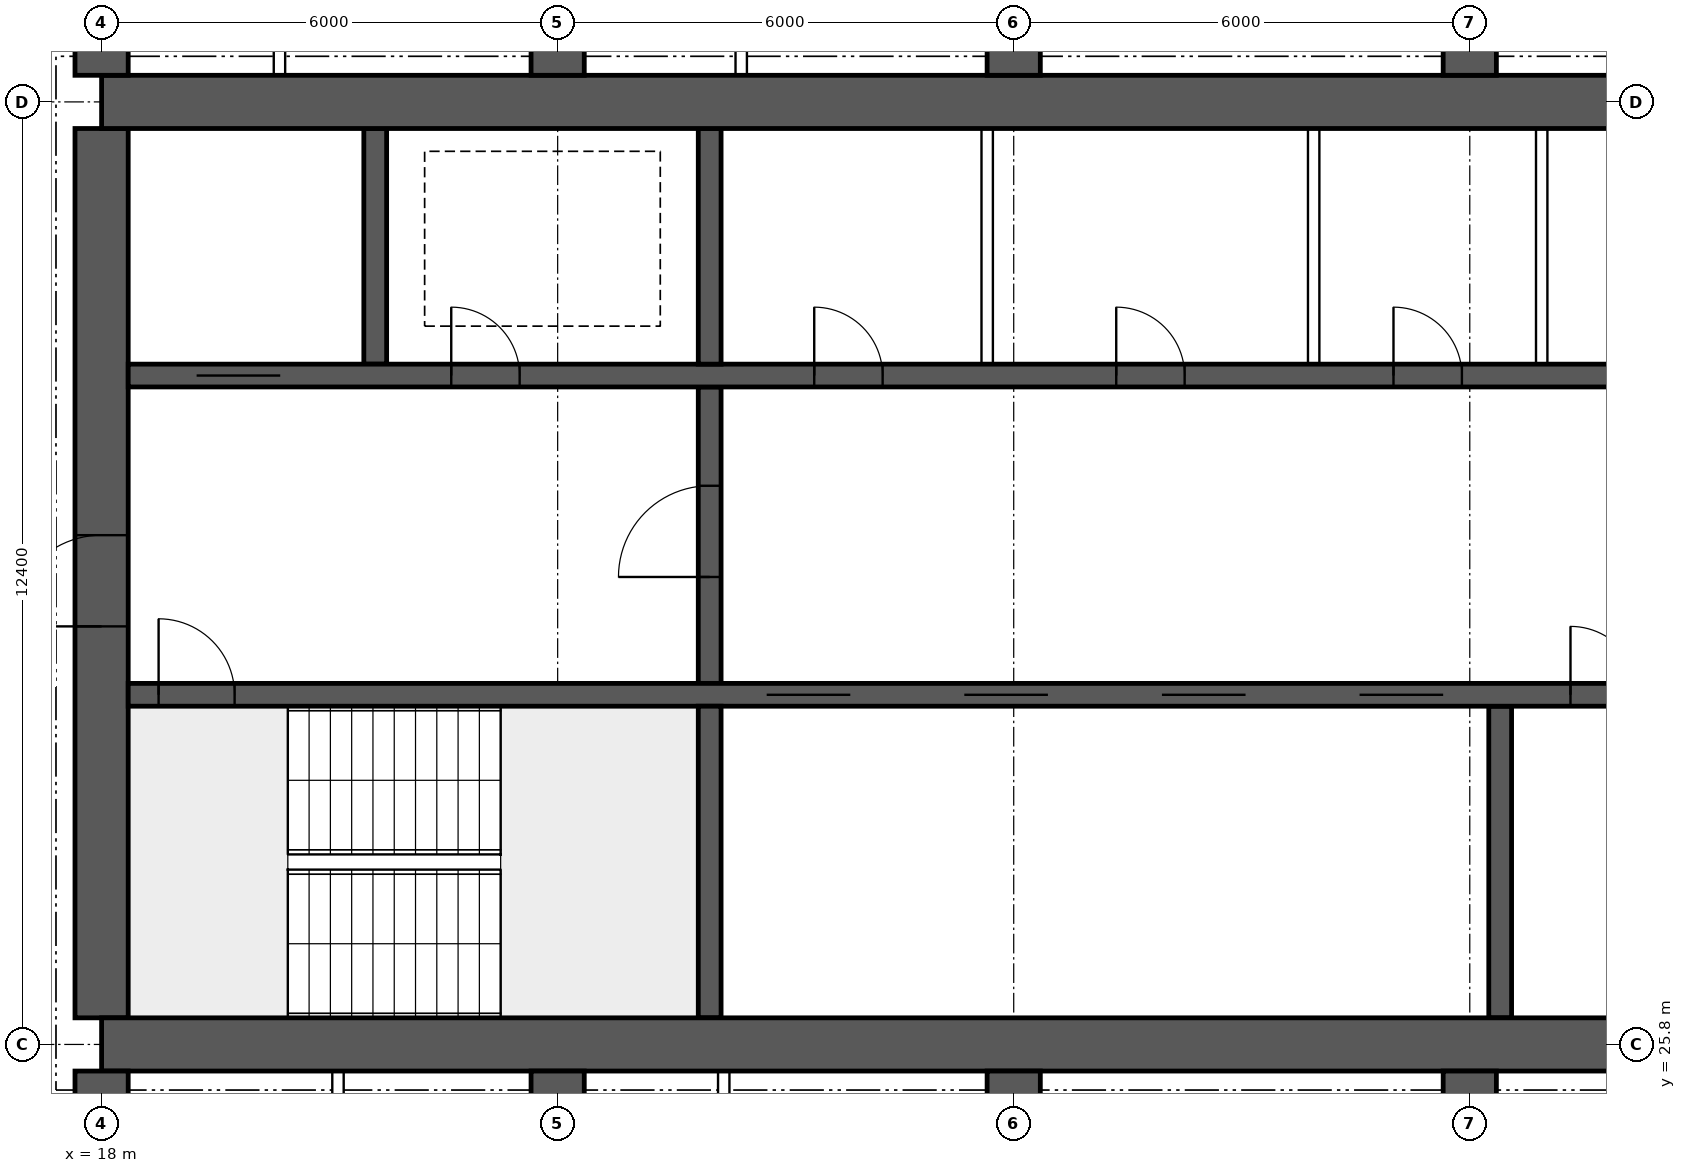
"""IFC4 building model, lengths in metres.
Left out: names, types, materials, properties, quantities, classifications, styles, units other than length and angle.
Written with IfcOpenShell. Run it as: python <this file> out.ifc"""

import sys

from ifc_helpers import new_model, si_unit, direction, frame, frame_2d, origin, place, context, subcontext, project, spatial, rectangle, extrude, element, fill, save


model = new_model("IFC4")
c1 = context("Model", 3, precision=1e-05, world=origin(), true_north=direction((0.0, 1.0)))
c2 = subcontext(c1, "Body", "Model", "MODEL_VIEW")
j1 = project(units=[si_unit("LENGTHUNIT", "METRE"), si_unit("PLANEANGLEUNIT", "RADIAN")], contexts=[c1])
p1 = place(None, origin())
s1 = spatial("IfcSite", under=j1, at=p1, CompositionType="ELEMENT")
p2 = place(p1, origin())
s2 = spatial("IfcBuilding", under=s1, at=p2, CompositionType="ELEMENT")
p3 = place(p2, frame((0.0, 0.0, 254.05)))
s3 = spatial("IfcBuildingStorey", under=s2, at=p3, CompositionType="ELEMENT", Elevation=254.05)
for number, where, z_axis, x_axis in (
    (1, (18.0, 25.8, 0.0), (0.0, 0.0, 1.0), (1.0, 0.0, 0.0)),
    (2, (18.0, 38.2, 0.0), (0.0, 0.0, 1.0), (1.0, 0.0, 0.0)),
):
    element("IfcWall", number, at=place(p3, frame(where, z_axis=z_axis, x_axis=x_axis)), inside=s3, PredefinedType="SHEAR", context=c2, shape_type="SweptSolid", body=[
        extrude(rectangle(XDim=48.0, YDim=0.7, at=frame_2d((24.0, 0.0))), origin(), (0.0, 0.0, 1.0), 3.75),
    ])
p4 = place(p3, frame((18.0, 26.15, 0.0), z_axis=(0.0, 0.0, 1.0), x_axis=(0.0, 1.0, 0.0)))
e3 = element("IfcWall", 3, at=p4, inside=s3, PredefinedType="SHEAR", context=c2, shape_type="SweptSolid", body=[
    extrude(rectangle(XDim=11.7, YDim=0.7, at=frame_2d((5.85, 0.0))), origin(), (0.0, 0.0, 1.0), 3.75),
])
p5 = place(p4, frame((5.15, 0.0, 0.0)))
e4 = element("IfcOpeningElement", 4, at=p5, cuts=e3, PredefinedType="OPENING", context=c2, shape_type="SweptSolid", body=[
    extrude(rectangle(XDim=1.2, YDim=2.1, at=frame_2d((0.6, 1.05))), frame((0.0, 0.36, 0.0), z_axis=(0.0, -1.0, 0.0), x_axis=(1.0, 0.0, 0.0)), (0.0, 0.0, 1.0), 0.72),
])
p6 = place(p3, frame((18.35, 30.4, 0.0), z_axis=(0.0, 0.0, 1.0), x_axis=(1.0, 0.0, 0.0)))
e5 = element("IfcWall", 5, at=p6, inside=s3, PredefinedType="SHEAR", context=c2, shape_type="SweptSolid", body=[
    extrude(rectangle(XDim=47.3, YDim=0.3, at=frame_2d((23.65, 0.0))), origin(), (0.0, 0.0, 1.0), 3.75),
])
p7 = place(p6, frame((0.4, 0.0, 0.0)))
e6 = element("IfcOpeningElement", 6, at=p7, cuts=e5, PredefinedType="OPENING", context=c2, shape_type="SweptSolid", body=[
    extrude(rectangle(XDim=1.0, YDim=2.1, at=frame_2d((0.5, 1.05))), frame((0.0, 0.16, 0.0), z_axis=(0.0, -1.0, 0.0), x_axis=(1.0, 0.0, 0.0)), (0.0, 0.0, 1.0), 0.32),
])
p8 = place(p6, frame((45.9, 0.0, 0.0)))
e7 = element("IfcOpeningElement", 7, at=p8, cuts=e5, PredefinedType="OPENING", context=c2, shape_type="SweptSolid", body=[
    extrude(rectangle(XDim=1.0, YDim=2.1, at=frame_2d((0.5, 1.05))), frame((0.0, 0.16, 0.0), z_axis=(0.0, -1.0, 0.0), x_axis=(1.0, 0.0, 0.0)), (0.0, 0.0, 1.0), 0.32),
])
p9 = place(p6, frame((8.4, 0.0, 0.0)))
e8 = element("IfcOpeningElement", 8, at=p9, cuts=e5, PredefinedType="OPENING", context=c2, shape_type="SweptSolid", body=[
    extrude(rectangle(XDim=1.1, YDim=2.1, at=frame_2d((0.55, 1.05))), frame((0.0, 0.16, 0.0), z_axis=(0.0, -1.0, 0.0), x_axis=(1.0, 0.0, 0.0)), (0.0, 0.0, 1.0), 0.32),
])
p10 = place(p6, frame((11.0, 0.0, 0.0)))
e9 = element("IfcOpeningElement", 9, at=p10, cuts=e5, PredefinedType="OPENING", context=c2, shape_type="SweptSolid", body=[
    extrude(rectangle(XDim=1.1, YDim=2.1, at=frame_2d((0.55, 1.05))), frame((0.0, 0.16, 0.0), z_axis=(0.0, -1.0, 0.0), x_axis=(1.0, 0.0, 0.0)), (0.0, 0.0, 1.0), 0.32),
])
p11 = place(p6, frame((13.6, 0.0, 0.0)))
e10 = element("IfcOpeningElement", 10, at=p11, cuts=e5, PredefinedType="OPENING", context=c2, shape_type="SweptSolid", body=[
    extrude(rectangle(XDim=1.1, YDim=2.1, at=frame_2d((0.55, 1.05))), frame((0.0, 0.16, 0.0), z_axis=(0.0, -1.0, 0.0), x_axis=(1.0, 0.0, 0.0)), (0.0, 0.0, 1.0), 0.32),
])
p12 = place(p6, frame((16.2, 0.0, 0.0)))
e11 = element("IfcOpeningElement", 11, at=p12, cuts=e5, PredefinedType="OPENING", context=c2, shape_type="SweptSolid", body=[
    extrude(rectangle(XDim=1.1, YDim=2.1, at=frame_2d((0.55, 1.05))), frame((0.0, 0.16, 0.0), z_axis=(0.0, -1.0, 0.0), x_axis=(1.0, 0.0, 0.0)), (0.0, 0.0, 1.0), 0.32),
])
p13 = place(p6, frame((18.975, 0.0, 0.0)))
e12 = element("IfcOpeningElement", 12, at=p13, cuts=e5, PredefinedType="OPENING", context=c2, shape_type="SweptSolid", body=[
    extrude(rectangle(XDim=0.9, YDim=2.1, at=frame_2d((0.45, 1.05))), frame((0.0, 0.16, 0.0), z_axis=(0.0, -1.0, 0.0), x_axis=(1.0, 0.0, 0.0)), (0.0, 0.0, 1.0), 0.32),
])
p14 = place(p6, frame((24.475, 0.0, 0.0)))
e13 = element("IfcOpeningElement", 13, at=p14, cuts=e5, PredefinedType="OPENING", context=c2, shape_type="SweptSolid", body=[
    extrude(rectangle(XDim=0.9, YDim=2.1, at=frame_2d((0.45, 1.05))), frame((0.0, 0.16, 0.0), z_axis=(0.0, -1.0, 0.0), x_axis=(1.0, 0.0, 0.0)), (0.0, 0.0, 1.0), 0.32),
])
p15 = place(p6, frame((30.267, 0.0, 0.0)))
e14 = element("IfcOpeningElement", 14, at=p15, cuts=e5, PredefinedType="OPENING", context=c2, shape_type="SweptSolid", body=[
    extrude(rectangle(XDim=1.1, YDim=2.1, at=frame_2d((0.55, 1.05))), frame((0.0, 0.16, 0.0), z_axis=(0.0, -1.0, 0.0), x_axis=(1.0, 0.0, 0.0)), (0.0, 0.0, 1.0), 0.32),
])
p16 = place(p6, frame((33.8, 0.0, 0.0)))
e15 = element("IfcOpeningElement", 15, at=p16, cuts=e5, PredefinedType="OPENING", context=c2, shape_type="SweptSolid", body=[
    extrude(rectangle(XDim=1.1, YDim=2.1, at=frame_2d((0.55, 1.05))), frame((0.0, 0.16, 0.0), z_axis=(0.0, -1.0, 0.0), x_axis=(1.0, 0.0, 0.0)), (0.0, 0.0, 1.0), 0.32),
])
p17 = place(p6, frame((37.333, 0.0, 0.0)))
e16 = element("IfcOpeningElement", 16, at=p17, cuts=e5, PredefinedType="OPENING", context=c2, shape_type="SweptSolid", body=[
    extrude(rectangle(XDim=1.1, YDim=2.1, at=frame_2d((0.55, 1.05))), frame((0.0, 0.16, 0.0), z_axis=(0.0, -1.0, 0.0), x_axis=(1.0, 0.0, 0.0)), (0.0, 0.0, 1.0), 0.32),
])
p18 = place(p3, frame((18.35, 34.6, 0.0), z_axis=(0.0, 0.0, 1.0), x_axis=(1.0, 0.0, 0.0)))
e17 = element("IfcWall", 17, at=p18, inside=s3, PredefinedType="SHEAR", context=c2, shape_type="SweptSolid", body=[
    extrude(rectangle(XDim=47.3, YDim=0.3, at=frame_2d((23.65, 0.0))), origin(), (0.0, 0.0, 1.0), 3.75),
])
p19 = place(p18, frame((0.9, 0.0, 0.0)))
e18 = element("IfcOpeningElement", 18, at=p19, cuts=e17, PredefinedType="OPENING", context=c2, shape_type="SweptSolid", body=[
    extrude(rectangle(XDim=1.1, YDim=2.1, at=frame_2d((0.55, 1.05))), frame((0.0, 0.16, 0.0), z_axis=(0.0, -1.0, 0.0), x_axis=(1.0, 0.0, 0.0)), (0.0, 0.0, 1.0), 0.32),
])
p20 = place(p18, frame((45.3, 0.0, 0.0)))
e19 = element("IfcOpeningElement", 19, at=p20, cuts=e17, PredefinedType="OPENING", context=c2, shape_type="SweptSolid", body=[
    extrude(rectangle(XDim=1.1, YDim=2.1, at=frame_2d((0.55, 1.05))), frame((0.0, 0.16, 0.0), z_axis=(0.0, -1.0, 0.0), x_axis=(1.0, 0.0, 0.0)), (0.0, 0.0, 1.0), 0.32),
])
p21 = place(p18, frame((4.25, 0.0, 0.0)))
e20 = element("IfcOpeningElement", 20, at=p21, cuts=e17, PredefinedType="OPENING", context=c2, shape_type="SweptSolid", body=[
    extrude(rectangle(XDim=0.9, YDim=2.1, at=frame_2d((0.45, 1.05))), frame((0.0, 0.16, 0.0), z_axis=(0.0, -1.0, 0.0), x_axis=(1.0, 0.0, 0.0)), (0.0, 0.0, 1.0), 0.32),
])
p22 = place(p18, frame((42.15, 0.0, 0.0)))
e21 = element("IfcOpeningElement", 21, at=p22, cuts=e17, PredefinedType="OPENING", context=c2, shape_type="SweptSolid", body=[
    extrude(rectangle(XDim=0.9, YDim=2.1, at=frame_2d((0.45, 1.05))), frame((0.0, 0.16, 0.0), z_axis=(0.0, -1.0, 0.0), x_axis=(1.0, 0.0, 0.0)), (0.0, 0.0, 1.0), 0.32),
])
p23 = place(p18, frame((9.025, 0.0, 0.0)))
e22 = element("IfcOpeningElement", 22, at=p23, cuts=e17, PredefinedType="OPENING", context=c2, shape_type="SweptSolid", body=[
    extrude(rectangle(XDim=0.9, YDim=2.1, at=frame_2d((0.45, 1.05))), frame((0.0, 0.16, 0.0), z_axis=(0.0, -1.0, 0.0), x_axis=(1.0, 0.0, 0.0)), (0.0, 0.0, 1.0), 0.32),
])
p24 = place(p18, frame((12.999, 0.0, 0.0)))
e23 = element("IfcOpeningElement", 23, at=p24, cuts=e17, PredefinedType="OPENING", context=c2, shape_type="SweptSolid", body=[
    extrude(rectangle(XDim=0.9, YDim=2.1, at=frame_2d((0.45, 1.05))), frame((0.0, 0.16, 0.0), z_axis=(0.0, -1.0, 0.0), x_axis=(1.0, 0.0, 0.0)), (0.0, 0.0, 1.0), 0.32),
])
p25 = place(p18, frame((16.646, 0.0, 0.0)))
e24 = element("IfcOpeningElement", 24, at=p25, cuts=e17, PredefinedType="OPENING", context=c2, shape_type="SweptSolid", body=[
    extrude(rectangle(XDim=0.9, YDim=2.1, at=frame_2d((0.45, 1.05))), frame((0.0, 0.16, 0.0), z_axis=(0.0, -1.0, 0.0), x_axis=(1.0, 0.0, 0.0)), (0.0, 0.0, 1.0), 0.32),
])
p26 = place(p18, frame((20.405, 0.0, 0.0)))
e25 = element("IfcOpeningElement", 25, at=p26, cuts=e17, PredefinedType="OPENING", context=c2, shape_type="SweptSolid", body=[
    extrude(rectangle(XDim=0.9, YDim=2.1, at=frame_2d((0.45, 1.05))), frame((0.0, 0.16, 0.0), z_axis=(0.0, -1.0, 0.0), x_axis=(1.0, 0.0, 0.0)), (0.0, 0.0, 1.0), 0.32),
])
p27 = place(p18, frame((24.811, 0.0, 0.0)))
e26 = element("IfcOpeningElement", 26, at=p27, cuts=e17, PredefinedType="OPENING", context=c2, shape_type="SweptSolid", body=[
    extrude(rectangle(XDim=0.9, YDim=2.1, at=frame_2d((0.45, 1.05))), frame((0.0, 0.16, 0.0), z_axis=(0.0, -1.0, 0.0), x_axis=(1.0, 0.0, 0.0)), (0.0, 0.0, 1.0), 0.32),
])
p28 = place(p18, frame((27.608, 0.0, 0.0)))
e27 = element("IfcOpeningElement", 27, at=p28, cuts=e17, PredefinedType="OPENING", context=c2, shape_type="SweptSolid", body=[
    extrude(rectangle(XDim=0.9, YDim=2.1, at=frame_2d((0.45, 1.05))), frame((0.0, 0.16, 0.0), z_axis=(0.0, -1.0, 0.0), x_axis=(1.0, 0.0, 0.0)), (0.0, 0.0, 1.0), 0.32),
])
p29 = place(p18, frame((29.981, 0.0, 0.0)))
e28 = element("IfcOpeningElement", 28, at=p29, cuts=e17, PredefinedType="OPENING", context=c2, shape_type="SweptSolid", body=[
    extrude(rectangle(XDim=0.9, YDim=2.1, at=frame_2d((0.45, 1.05))), frame((0.0, 0.16, 0.0), z_axis=(0.0, -1.0, 0.0), x_axis=(1.0, 0.0, 0.0)), (0.0, 0.0, 1.0), 0.32),
])
p30 = place(p18, frame((35.451, 0.0, 0.0)))
e29 = element("IfcOpeningElement", 29, at=p30, cuts=e17, PredefinedType="OPENING", context=c2, shape_type="SweptSolid", body=[
    extrude(rectangle(XDim=0.9, YDim=2.1, at=frame_2d((0.45, 1.05))), frame((0.0, 0.16, 0.0), z_axis=(0.0, -1.0, 0.0), x_axis=(1.0, 0.0, 0.0)), (0.0, 0.0, 1.0), 0.32),
])
p31 = place(p3, frame((26.0, 26.15, 0.0), z_axis=(0.0, 0.0, 1.0), x_axis=(0.0, 1.0, 0.0)))
e30 = element("IfcWall", 30, at=p31, inside=s3, PredefinedType="SHEAR", context=c2, shape_type="SweptSolid", body=[
    extrude(rectangle(XDim=4.1, YDim=0.3, at=frame_2d((2.05, 0.0))), origin(), (0.0, 0.0, 1.0), 3.75),
])
p32 = place(p3, frame((26.0, 30.55, 0.0), z_axis=(0.0, 0.0, 1.0), x_axis=(0.0, 1.0, 0.0)))
e31 = element("IfcWall", 31, at=p32, inside=s3, PredefinedType="SHEAR", context=c2, shape_type="SweptSolid", body=[
    extrude(rectangle(XDim=3.9, YDim=0.3, at=frame_2d((1.95, 0.0))), origin(), (0.0, 0.0, 1.0), 3.75),
])
p33 = place(p32, frame((1.4, 0.0, 0.0)))
e32 = element("IfcOpeningElement", 32, at=p33, cuts=e31, PredefinedType="OPENING", context=c2, shape_type="SweptSolid", body=[
    extrude(rectangle(XDim=1.2, YDim=2.1, at=frame_2d((0.6, 1.05))), frame((0.0, 0.16, 0.0), z_axis=(0.0, -1.0, 0.0), x_axis=(1.0, 0.0, 0.0)), (0.0, 0.0, 1.0), 0.32),
])
for number, where, z_axis, x_axis in (
    (33, (21.6, 34.75, 0.0), (0.0, 0.0, 1.0), (0.0, 1.0, 0.0)),
    (34, (26.0, 34.75, 0.0), (0.0, 0.0, 1.0), (0.0, 1.0, 0.0)),
):
    element("IfcWall", number, at=place(p3, frame(where, z_axis=z_axis, x_axis=x_axis)), inside=s3, PredefinedType="SHEAR", context=c2, shape_type="SweptSolid", body=[
        extrude(rectangle(XDim=3.1, YDim=0.3, at=frame_2d((1.55, 0.0))), origin(), (0.0, 0.0, 1.0), 3.75),
    ])
p34 = place(p3, frame((36.4, 26.15, 0.0), z_axis=(0.0, 0.0, 1.0), x_axis=(0.0, 1.0, 0.0)))
e35 = element("IfcWall", 35, at=p34, inside=s3, PredefinedType="SHEAR", context=c2, shape_type="SweptSolid", body=[
    extrude(rectangle(XDim=4.1, YDim=0.3, at=frame_2d((2.05, 0.0))), origin(), (0.0, 0.0, 1.0), 3.75),
])
for number, where, z_axis, x_axis in (
    (36, (18.0, 18.4, 0.0), (0.0, 0.0, 1.0), (0.0, 1.0, 0.0)),
    (37, (18.0, 38.55, 0.0), (0.0, 0.0, 1.0), (0.0, 1.0, 0.0)),
    (38, (24.0, 18.4, 0.0), (0.0, 0.0, 1.0), (0.0, 1.0, 0.0)),
    (39, (24.0, 38.55, 0.0), (0.0, 0.0, 1.0), (0.0, 1.0, 0.0)),
    (40, (30.0, 18.4, 0.0), (0.0, 0.0, 1.0), (0.0, 1.0, 0.0)),
    (41, (30.0, 38.55, 0.0), (0.0, 0.0, 1.0), (0.0, 1.0, 0.0)),
    (42, (36.0, 18.4, 0.0), (0.0, 0.0, 1.0), (0.0, 1.0, 0.0)),
    (43, (36.0, 38.55, 0.0), (0.0, 0.0, 1.0), (0.0, 1.0, 0.0)),
):
    element("IfcWall", number, at=place(p3, frame(where, z_axis=z_axis, x_axis=x_axis)), inside=s3, PredefinedType="SHEAR", context=c2, shape_type="SweptSolid", body=[
        extrude(rectangle(XDim=7.05, YDim=0.7, at=frame_2d((3.525, 0.0))), origin(), (0.0, 0.0, 1.0), 3.75),
    ])
for number, where, z_axis, x_axis in (
    (44, (29.651, 34.75, 0.0), (0.0, 0.0, 1.0), (0.0, 1.0, 0.0)),
    (45, (33.946, 34.75, 0.0), (0.0, 0.0, 1.0), (0.0, 1.0, 0.0)),
    (46, (36.946, 34.75, 0.0), (0.0, 0.0, 1.0), (0.0, 1.0, 0.0)),
):
    element("IfcWall", number, at=place(p3, frame(where, z_axis=z_axis, x_axis=x_axis)), inside=s3, PredefinedType="SOLIDWALL", context=c2, shape_type="SweptSolid", body=[
        extrude(rectangle(XDim=3.1, YDim=0.15, at=frame_2d((1.55, 0.0))), origin(), (0.0, 0.0, 1.0), 3.45),
    ])
for number, where, z_axis, x_axis in (
    (47, (21.11, 18.5, 0.0), (0.0, 0.0, 1.0), (0.0, 1.0, 0.0)),
    (48, (26.185, 18.5, 0.0), (0.0, 0.0, 1.0), (0.0, 1.0, 0.0)),
    (49, (20.34, 38.55, 0.0), (0.0, 0.0, 1.0), (0.0, 1.0, 0.0)),
    (50, (26.415, 38.55, 0.0), (0.0, 0.0, 1.0), (0.0, 1.0, 0.0)),
):
    element("IfcWall", number, at=place(p3, frame(where, z_axis=z_axis, x_axis=x_axis)), inside=s3, PredefinedType="PARTITIONING", context=c2, shape_type="SweptSolid", body=[
        extrude(rectangle(XDim=6.95, YDim=0.15, at=frame_2d((3.475, 0.0))), origin(), (0.0, 0.0, 1.0), 3.45),
    ])
p35 = place(p5, origin())
e51 = element("IfcDoor", 51, at=p35, inside=s3, OperationType="SINGLE_SWING_LEFT", PredefinedType="DOOR", context=c2, shape_type="SweptSolid", body=[
    extrude(rectangle(XDim=1.2, YDim=2.1, at=frame_2d((0.6, 1.05))), frame((0.0, 0.025, 0.0), z_axis=(0.0, -1.0, 0.0), x_axis=(1.0, 0.0, 0.0)), (0.0, 0.0, 1.0), 0.05),
])
fill(e4, e51)
p36 = place(p7, origin())
e52 = element("IfcDoor", 52, at=p36, inside=s3, OperationType="SINGLE_SWING_LEFT", PredefinedType="DOOR", context=c2, shape_type="SweptSolid", body=[
    extrude(rectangle(XDim=1.0, YDim=2.1, at=frame_2d((0.5, 1.05))), frame((0.0, 0.025, 0.0), z_axis=(0.0, -1.0, 0.0), x_axis=(1.0, 0.0, 0.0)), (0.0, 0.0, 1.0), 0.05),
])
fill(e6, e52)
p37 = place(p19, origin())
e53 = element("IfcDoor", 53, at=p37, inside=s3, OperationType="DOUBLE_DOOR_SLIDING", PredefinedType="DOOR", context=c2, shape_type="SweptSolid", body=[
    extrude(rectangle(XDim=1.1, YDim=2.1, at=frame_2d((0.55, 1.05))), frame((0.0, 0.025, 0.0), z_axis=(0.0, -1.0, 0.0), x_axis=(1.0, 0.0, 0.0)), (0.0, 0.0, 1.0), 0.05),
])
fill(e18, e53)
p38 = place(p21, origin())
e54 = element("IfcDoor", 54, at=p38, inside=s3, OperationType="SINGLE_SWING_LEFT", PredefinedType="DOOR", context=c2, shape_type="SweptSolid", body=[
    extrude(rectangle(XDim=0.9, YDim=2.1, at=frame_2d((0.45, 1.05))), frame((0.0, 0.025, 0.0), z_axis=(0.0, -1.0, 0.0), x_axis=(1.0, 0.0, 0.0)), (0.0, 0.0, 1.0), 0.05),
])
fill(e20, e54)
p39 = place(p33, origin())
e55 = element("IfcDoor", 55, at=p39, inside=s3, OperationType="SINGLE_SWING_LEFT", PredefinedType="DOOR", context=c2, shape_type="SweptSolid", body=[
    extrude(rectangle(XDim=1.2, YDim=2.1, at=frame_2d((0.6, 1.05))), frame((0.0, 0.025, 0.0), z_axis=(0.0, -1.0, 0.0), x_axis=(1.0, 0.0, 0.0)), (0.0, 0.0, 1.0), 0.05),
])
fill(e32, e55)
p40 = place(p23, origin())
e56 = element("IfcDoor", 56, at=p40, inside=s3, OperationType="SINGLE_SWING_LEFT", PredefinedType="DOOR", context=c2, shape_type="SweptSolid", body=[
    extrude(rectangle(XDim=0.9, YDim=2.1, at=frame_2d((0.45, 1.05))), frame((0.0, 0.025, 0.0), z_axis=(0.0, -1.0, 0.0), x_axis=(1.0, 0.0, 0.0)), (0.0, 0.0, 1.0), 0.05),
])
fill(e22, e56)
p41 = place(p24, origin())
e57 = element("IfcDoor", 57, at=p41, inside=s3, OperationType="SINGLE_SWING_LEFT", PredefinedType="DOOR", context=c2, shape_type="SweptSolid", body=[
    extrude(rectangle(XDim=0.9, YDim=2.1, at=frame_2d((0.45, 1.05))), frame((0.0, 0.025, 0.0), z_axis=(0.0, -1.0, 0.0), x_axis=(1.0, 0.0, 0.0)), (0.0, 0.0, 1.0), 0.05),
])
fill(e23, e57)
p42 = place(p25, origin())
e58 = element("IfcDoor", 58, at=p42, inside=s3, OperationType="SINGLE_SWING_LEFT", PredefinedType="DOOR", context=c2, shape_type="SweptSolid", body=[
    extrude(rectangle(XDim=0.9, YDim=2.1, at=frame_2d((0.45, 1.05))), frame((0.0, 0.025, 0.0), z_axis=(0.0, -1.0, 0.0), x_axis=(1.0, 0.0, 0.0)), (0.0, 0.0, 1.0), 0.05),
])
fill(e24, e58)
p43 = place(p9, origin())
e59 = element("IfcDoor", 59, at=p43, inside=s3, OperationType="DOUBLE_DOOR_SLIDING", PredefinedType="DOOR", context=c2, shape_type="SweptSolid", body=[
    extrude(rectangle(XDim=1.1, YDim=2.1, at=frame_2d((0.55, 1.05))), frame((0.0, 0.025, 0.0), z_axis=(0.0, -1.0, 0.0), x_axis=(1.0, 0.0, 0.0)), (0.0, 0.0, 1.0), 0.05),
])
fill(e8, e59)
p44 = place(p10, origin())
e60 = element("IfcDoor", 60, at=p44, inside=s3, OperationType="DOUBLE_DOOR_SLIDING", PredefinedType="DOOR", context=c2, shape_type="SweptSolid", body=[
    extrude(rectangle(XDim=1.1, YDim=2.1, at=frame_2d((0.55, 1.05))), frame((0.0, 0.025, 0.0), z_axis=(0.0, -1.0, 0.0), x_axis=(1.0, 0.0, 0.0)), (0.0, 0.0, 1.0), 0.05),
])
fill(e9, e60)
p45 = place(p11, origin())
e61 = element("IfcDoor", 61, at=p45, inside=s3, OperationType="DOUBLE_DOOR_SLIDING", PredefinedType="DOOR", context=c2, shape_type="SweptSolid", body=[
    extrude(rectangle(XDim=1.1, YDim=2.1, at=frame_2d((0.55, 1.05))), frame((0.0, 0.025, 0.0), z_axis=(0.0, -1.0, 0.0), x_axis=(1.0, 0.0, 0.0)), (0.0, 0.0, 1.0), 0.05),
])
fill(e10, e61)
p46 = place(p12, origin())
e62 = element("IfcDoor", 62, at=p46, inside=s3, OperationType="DOUBLE_DOOR_SLIDING", PredefinedType="DOOR", context=c2, shape_type="SweptSolid", body=[
    extrude(rectangle(XDim=1.1, YDim=2.1, at=frame_2d((0.55, 1.05))), frame((0.0, 0.025, 0.0), z_axis=(0.0, -1.0, 0.0), x_axis=(1.0, 0.0, 0.0)), (0.0, 0.0, 1.0), 0.05),
])
fill(e11, e62)
p47 = place(p13, origin())
e63 = element("IfcDoor", 63, at=p47, inside=s3, OperationType="SINGLE_SWING_LEFT", PredefinedType="DOOR", context=c2, shape_type="SweptSolid", body=[
    extrude(rectangle(XDim=0.9, YDim=2.1, at=frame_2d((0.45, 1.05))), frame((0.0, 0.025, 0.0), z_axis=(0.0, -1.0, 0.0), x_axis=(1.0, 0.0, 0.0)), (0.0, 0.0, 1.0), 0.05),
])
fill(e12, e63)
save(model, sys.argv[1])
